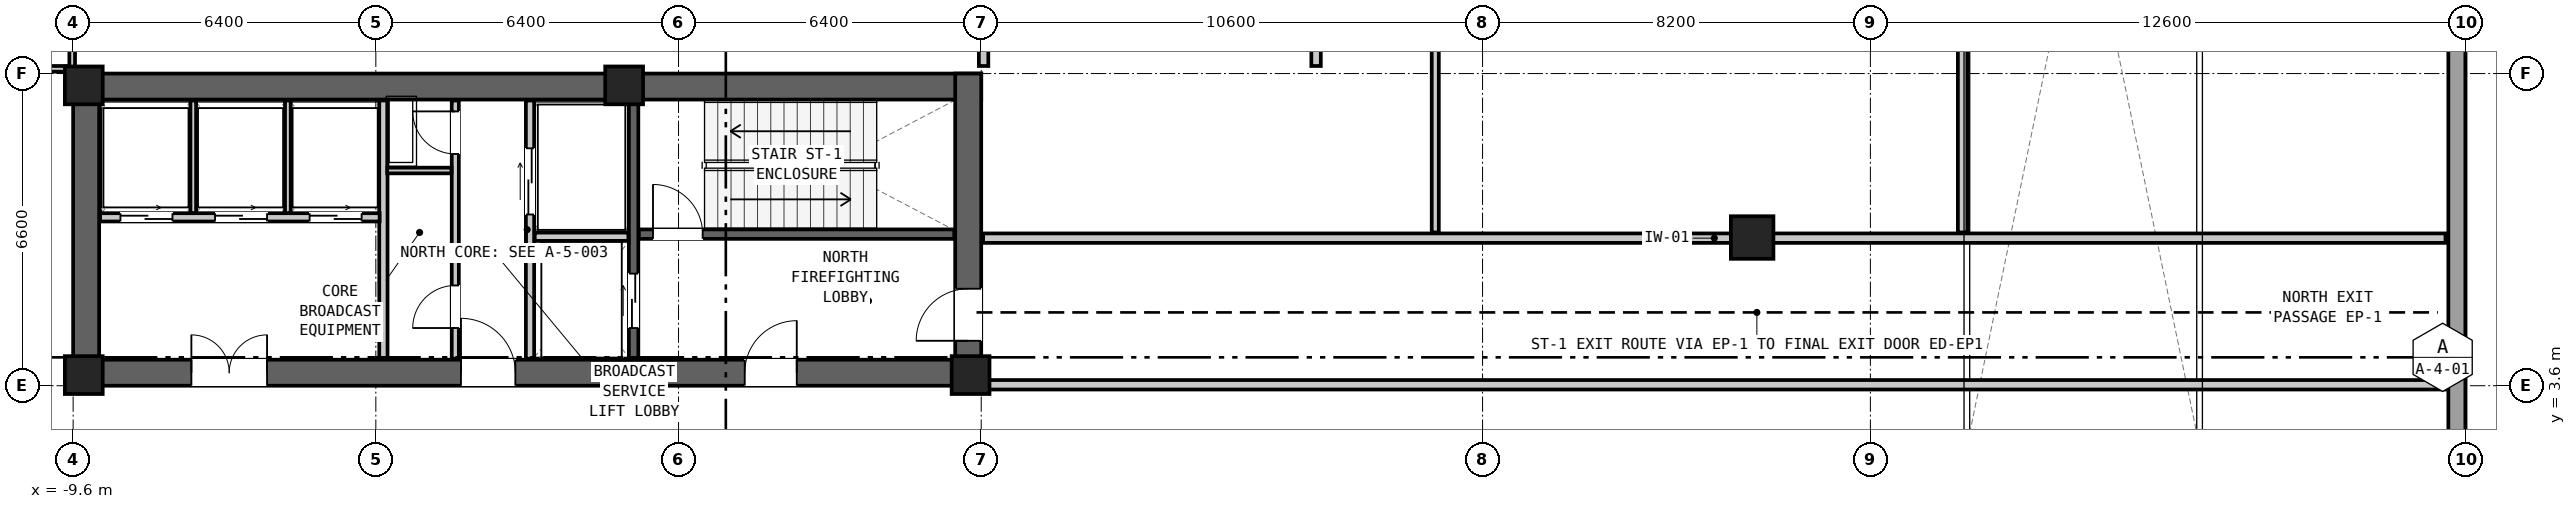
"""IFC4 building model, lengths in metres.
Left out: names, types, materials, properties, quantities, classifications, styles, units other than length and angle.
Written with IfcOpenShell. Run it as: python <this file> out.ifc"""

import sys

from ifc_helpers import new_model, si_unit, direction, frame, frame_2d, origin, origin_2d, place, context, subcontext, project, spatial, rectangle, hollow_rectangle, extrude, element, fill, save


model = new_model("IFC4")
c1 = context("Model", 3, precision=1e-05, world=origin(), true_north=direction((0.0, 1.0)))
c2 = subcontext(c1, "Body", "Model", "MODEL_VIEW")
j1 = project(units=[si_unit("LENGTHUNIT", "METRE"), si_unit("PLANEANGLEUNIT", "RADIAN")], contexts=[c1])
p1 = place(None, origin())
s1 = spatial("IfcSite", under=j1, at=p1, CompositionType="ELEMENT")
p2 = place(p1, origin())
s2 = spatial("IfcBuilding", under=s1, at=p2, CompositionType="ELEMENT")
p3 = place(p2, origin())
s3 = spatial("IfcBuildingStorey", under=s2, at=p3, CompositionType="ELEMENT", Elevation=0.0)
p4 = place(p3, frame((-9.6, 9.925, 0.0), z_axis=(0.0, 0.0, 1.0), x_axis=(1.0, 0.0, 0.0)))
e1 = element("IfcWall", 1, at=p4, inside=s3, PredefinedType="SHEAR", context=c2, shape_type="SweptSolid", body=[
    extrude(rectangle(XDim=19.2, YDim=0.55, at=frame_2d((9.6, 0.0))), origin(), (0.0, 0.0, 1.0), 5.1),
])
p5 = place(p3, frame((-9.6, 3.875, 0.0), z_axis=(0.0, 0.0, 1.0), x_axis=(1.0, 0.0, 0.0)))
e2 = element("IfcWall", 2, at=p5, inside=s3, PredefinedType="SHEAR", context=c2, shape_type="SweptSolid", body=[
    extrude(rectangle(XDim=19.2, YDim=0.55, at=frame_2d((9.6, 0.0))), origin(), (0.0, 0.0, 1.0), 5.1),
])
p6 = place(p5, frame((14.2, 0.0, 0.0)))
e3 = element("IfcOpeningElement", 3, at=p6, cuts=e2, PredefinedType="OPENING", context=c2, shape_type="SweptSolid", body=[
    extrude(rectangle(XDim=1.1, YDim=2.08, at=frame_2d((0.55, 1.04))), frame((0.0, 0.287, 0.0), z_axis=(0.0, -1.0, 0.0), x_axis=(1.0, 0.0, 0.0)), (0.0, 0.0, 1.0), 0.574),
])
p7 = place(p5, frame((8.2, 0.0, 0.0)))
e4 = element("IfcOpeningElement", 4, at=p7, cuts=e2, PredefinedType="OPENING", context=c2, shape_type="SweptSolid", body=[
    extrude(rectangle(XDim=1.15, YDim=2.1, at=frame_2d((0.575, 1.05))), frame((0.0, 0.287, 0.0), z_axis=(0.0, -1.0, 0.0), x_axis=(1.0, 0.0, 0.0)), (0.0, 0.0, 1.0), 0.574),
])
p8 = place(p5, frame((2.5, 0.0, 0.0)))
e5 = element("IfcOpeningElement", 5, at=p8, cuts=e2, PredefinedType="OPENING", context=c2, shape_type="SweptSolid", body=[
    extrude(rectangle(XDim=1.6, YDim=2.12, at=frame_2d((0.8, 1.06))), frame((0.0, 0.287, 0.0), z_axis=(0.0, -1.0, 0.0), x_axis=(1.0, 0.0, 0.0)), (0.0, 0.0, 1.0), 0.574),
])
p9 = place(p3, frame((-9.325, 3.6, 0.0), z_axis=(0.0, 0.0, 1.0), x_axis=(0.0, 1.0, 0.0)))
e6 = element("IfcWall", 6, at=p9, inside=s3, PredefinedType="SHEAR", context=c2, shape_type="SweptSolid", body=[
    extrude(rectangle(XDim=6.6, YDim=0.55, at=frame_2d((3.3, 0.0))), origin(), (0.0, 0.0, 1.0), 5.1),
])
p10 = place(p3, frame((9.325, 3.6, 0.0), z_axis=(0.0, 0.0, 1.0), x_axis=(0.0, 1.0, 0.0)))
e7 = element("IfcWall", 7, at=p10, inside=s3, PredefinedType="SHEAR", context=c2, shape_type="SweptSolid", body=[
    extrude(rectangle(XDim=6.6, YDim=0.55, at=frame_2d((3.3, 0.0))), origin(), (0.0, 0.0, 1.0), 5.1),
])
p11 = place(p10, frame((0.95, 0.0, 0.0)))
e8 = element("IfcOpeningElement", 8, at=p11, cuts=e7, PredefinedType="OPENING", context=c2, shape_type="SweptSolid", body=[
    extrude(rectangle(XDim=1.1, YDim=2.08, at=frame_2d((0.55, 1.04))), frame((0.0, 0.287, 0.0), z_axis=(0.0, -1.0, 0.0), x_axis=(1.0, 0.0, 0.0)), (0.0, 0.0, 1.0), 0.574),
])
p12 = place(p3, frame((25.9, 6.733, 0.0), z_axis=(0.0, 0.0, 1.0), x_axis=(0.0, 1.0, 0.0)))
e9 = element("IfcColumn", 9, at=p12, inside=s3, PredefinedType="COLUMN", context=c2, shape_type="SweptSolid", body=[
    extrude(hollow_rectangle(XDim=0.9, YDim=0.9, WallThickness=0.055, at=origin_2d()), origin(), (0.0, 0.0, 1.0), 5.1),
])
for number, where, z_axis, x_axis in (
    (10, (-9.375, 9.95, 0.0), (0.0, 0.0, 1.0), (1.0, 0.0, 0.0)),
    (11, (2.05, 9.95, 0.0), (0.0, 0.0, 1.0), (1.0, 0.0, 0.0)),
    (12, (-9.375, 3.825, 0.0), (0.0, 0.0, 1.0), (1.0, 0.0, 0.0)),
    (13, (9.375, 3.825, 0.0), (0.0, 0.0, 1.0), (1.0, 0.0, 0.0)),
):
    element("IfcColumn", number, at=place(p3, frame(where, z_axis=z_axis, x_axis=x_axis)), inside=s3, PredefinedType="COLUMN", context=c2, shape_type="SweptSolid", body=[
        extrude(rectangle(XDim=0.8, YDim=0.8, at=origin_2d()), origin(), (0.0, 0.0, 1.0), 5.1),
    ])
p13 = place(p3, frame((40.8, 27.8, 0.0), z_axis=(0.0, 0.0, 1.0), x_axis=(0.0, -1.0, 0.0)))
e14 = element("IfcWall", 14, at=p13, inside=s3, PredefinedType="SOLIDWALL", context=c2, shape_type="SweptSolid", body=[
    extrude(rectangle(XDim=33.35, YDim=0.36, at=frame_2d((16.675, 0.0))), origin(), (0.0, 0.0, 1.0), 4.78),
])
p14 = place(p13, frame((9.8, 0.0, 0.0)))
e15 = element("IfcOpeningElement", 15, at=p14, cuts=e14, PredefinedType="OPENING", context=c2, shape_type="SweptSolid", body=[
    extrude(rectangle(XDim=1.8, YDim=2.25, at=frame_2d((0.9, 1.125))), frame((0.0, 0.192, 0.0), z_axis=(0.0, -1.0, 0.0), x_axis=(1.0, 0.0, 0.0)), (0.0, 0.0, 1.0), 0.384),
])
p15 = place(p3, frame((2.36, 6.805, 0.0), z_axis=(0.0, 0.0, 1.0), x_axis=(1.0, 0.0, 0.0)))
e16 = element("IfcWall", 16, at=p15, inside=s3, PredefinedType="SHEAR", context=c2, shape_type="SweptSolid", body=[
    extrude(rectangle(XDim=6.67, YDim=0.2, at=frame_2d((3.335, 0.0))), origin(), (0.0, 0.0, 1.0), 4.78),
])
p16 = place(p15, frame((0.3, 0.0, 0.0)))
e17 = element("IfcOpeningElement", 17, at=p16, cuts=e16, PredefinedType="OPENING", context=c2, shape_type="SweptSolid", body=[
    extrude(rectangle(XDim=1.05, YDim=2.08, at=frame_2d((0.525, 1.04))), frame((0.0, 0.112, 0.0), z_axis=(0.0, -1.0, 0.0), x_axis=(1.0, 0.0, 0.0)), (0.0, 0.0, 1.0), 0.224),
])
p17 = place(p3, frame((2.25, 4.17, 0.0), z_axis=(0.0, 0.0, 1.0), x_axis=(0.0, 1.0, 0.0)))
e18 = element("IfcWall", 18, at=p17, inside=s3, PredefinedType="SHEAR", context=c2, shape_type="SweptSolid", body=[
    extrude(rectangle(XDim=5.46, YDim=0.2, at=frame_2d((2.73, 0.0))), origin(), (0.0, 0.0, 1.0), 4.78),
])
p18 = place(p17, frame((0.65, 0.0, 0.0)))
e19 = element("IfcOpeningElement", 19, at=p18, cuts=e18, PredefinedType="OPENING", context=c2, shape_type="SweptSolid", body=[
    extrude(rectangle(XDim=1.15, YDim=2.08, at=frame_2d((0.575, 1.04))), frame((0.0, 0.112, 0.0), z_axis=(0.0, -1.0, 0.0), x_axis=(1.0, 0.0, 0.0)), (0.0, 0.0, 1.0), 0.224),
])
p19 = place(p3, frame((0.06, 4.17, 0.0), z_axis=(0.0, 0.0, 1.0), x_axis=(0.0, 1.0, 0.0)))
e20 = element("IfcWall", 20, at=p19, inside=s3, PredefinedType="PARTITIONING", context=c2, shape_type="SweptSolid", body=[
    extrude(rectangle(XDim=5.46, YDim=0.175, at=frame_2d((2.73, 0.0))), origin(), (0.0, 0.0, 1.0), 4.78),
])
p20 = place(p19, frame((3.05, 0.0, 0.0)))
e21 = element("IfcOpeningElement", 21, at=p20, cuts=e20, PredefinedType="OPENING", context=c2, shape_type="SweptSolid", body=[
    extrude(rectangle(XDim=1.4, YDim=2.12, at=frame_2d((0.7, 1.06))), frame((0.0, 0.1, 0.0), z_axis=(0.0, -1.0, 0.0), x_axis=(1.0, 0.0, 0.0)), (0.0, 0.0, 1.0), 0.199),
])
p21 = place(p3, frame((0.16, 6.75, 0.0), z_axis=(0.0, 0.0, 1.0), x_axis=(1.0, 0.0, 0.0)))
e22 = element("IfcWall", 22, at=p21, inside=s3, PredefinedType="PARTITIONING", context=c2, shape_type="SweptSolid", body=[
    extrude(rectangle(XDim=1.98, YDim=0.175, at=frame_2d((0.99, 0.0))), origin(), (0.0, 0.0, 1.0), 4.78),
])
p22 = place(p3, frame((-3.04, 4.17, 0.0), z_axis=(0.0, 0.0, 1.0), x_axis=(0.0, 1.0, 0.0)))
e23 = element("IfcWall", 23, at=p22, inside=s3, PredefinedType="PARTITIONING", context=c2, shape_type="SweptSolid", body=[
    extrude(rectangle(XDim=5.46, YDim=0.175, at=frame_2d((2.73, 0.0))), origin(), (0.0, 0.0, 1.0), 4.78),
])
p23 = place(p3, frame((-1.52, 4.17, 0.0), z_axis=(0.0, 0.0, 1.0), x_axis=(0.0, 1.0, 0.0)))
e24 = element("IfcWall", 24, at=p23, inside=s3, PredefinedType="PARTITIONING", context=c2, shape_type="SweptSolid", body=[
    extrude(rectangle(XDim=5.46, YDim=0.15, at=frame_2d((2.73, 0.0))), origin(), (0.0, 0.0, 1.0), 4.78),
])
p24 = place(p23, frame((4.33, 0.0, 0.0)))
e25 = element("IfcOpeningElement", 25, at=p24, cuts=e24, PredefinedType="OPENING", context=c2, shape_type="SweptSolid", body=[
    extrude(rectangle(XDim=0.9, YDim=2.05, at=frame_2d((0.45, 1.025))), frame((0.0, 0.087, 0.0), z_axis=(0.0, -1.0, 0.0), x_axis=(1.0, 0.0, 0.0)), (0.0, 0.0, 1.0), 0.174),
])
p25 = place(p23, frame((0.65, 0.0, 0.0)))
e26 = element("IfcOpeningElement", 26, at=p25, cuts=e24, PredefinedType="OPENING", context=c2, shape_type="SweptSolid", body=[
    extrude(rectangle(XDim=0.9, YDim=2.05, at=frame_2d((0.45, 1.025))), frame((0.0, 0.087, 0.0), z_axis=(0.0, -1.0, 0.0), x_axis=(1.0, 0.0, 0.0)), (0.0, 0.0, 1.0), 0.174),
])
p26 = place(p3, frame((-2.96, 8.15, 0.0), z_axis=(0.0, 0.0, 1.0), x_axis=(1.0, 0.0, 0.0)))
e27 = element("IfcWall", 27, at=p26, inside=s3, PredefinedType="PARTITIONING", context=c2, shape_type="SweptSolid", body=[
    extrude(rectangle(XDim=1.36, YDim=0.12, at=frame_2d((0.68, 0.0))), origin(), (0.0, 0.0, 1.0), 4.78),
])
p27 = place(p3, frame((-9.03, 7.16, 0.0), z_axis=(0.0, 0.0, 1.0), x_axis=(1.0, 0.0, 0.0)))
e28 = element("IfcWall", 28, at=p27, inside=s3, PredefinedType="PARTITIONING", context=c2, shape_type="SweptSolid", body=[
    extrude(rectangle(XDim=5.91, YDim=0.175, at=frame_2d((2.955, 0.0))), origin(), (0.0, 0.0, 1.0), 4.78),
])
p28 = place(p27, frame((0.43, 0.0, 0.0)))
e29 = element("IfcOpeningElement", 29, at=p28, cuts=e28, PredefinedType="OPENING", context=c2, shape_type="SweptSolid", body=[
    extrude(rectangle(XDim=1.1, YDim=2.06, at=frame_2d((0.55, 1.03))), frame((0.0, 0.1, 0.0), z_axis=(0.0, -1.0, 0.0), x_axis=(1.0, 0.0, 0.0)), (0.0, 0.0, 1.0), 0.199),
])
p29 = place(p27, frame((2.43, 0.0, 0.0)))
e30 = element("IfcOpeningElement", 30, at=p29, cuts=e28, PredefinedType="OPENING", context=c2, shape_type="SweptSolid", body=[
    extrude(rectangle(XDim=1.1, YDim=2.06, at=frame_2d((0.55, 1.03))), frame((0.0, 0.1, 0.0), z_axis=(0.0, -1.0, 0.0), x_axis=(1.0, 0.0, 0.0)), (0.0, 0.0, 1.0), 0.199),
])
p30 = place(p27, frame((4.43, 0.0, 0.0)))
e31 = element("IfcOpeningElement", 31, at=p30, cuts=e28, PredefinedType="OPENING", context=c2, shape_type="SweptSolid", body=[
    extrude(rectangle(XDim=1.1, YDim=2.06, at=frame_2d((0.55, 1.03))), frame((0.0, 0.1, 0.0), z_axis=(0.0, -1.0, 0.0), x_axis=(1.0, 0.0, 0.0)), (0.0, 0.0, 1.0), 0.199),
])
for number, where, z_axis, x_axis in (
    (32, (-7.06, 7.25, 0.0), (0.0, 0.0, 1.0), (0.0, 1.0, 0.0)),
    (33, (-5.06, 7.25, 0.0), (0.0, 0.0, 1.0), (0.0, 1.0, 0.0)),
):
    element("IfcWall", number, at=place(p3, frame(where, z_axis=z_axis, x_axis=x_axis)), inside=s3, PredefinedType="PARTITIONING", context=c2, shape_type="SweptSolid", body=[
        extrude(rectangle(XDim=2.38, YDim=0.12, at=frame_2d((1.19, 0.0))), origin(), (0.0, 0.0, 1.0), 4.78),
    ])
p31 = place(p3, frame((9.64, 6.72, 0.0), z_axis=(0.0, 0.0, 1.0), x_axis=(1.0, 0.0, 0.0)))
e34 = element("IfcWall", 34, at=p31, inside=s3, PredefinedType="PARTITIONING", context=c2, shape_type="SweptSolid", body=[
    extrude(rectangle(XDim=30.92, YDim=0.2, at=frame_2d((15.46, 0.0))), origin(), (0.0, 0.0, 1.0), 4.78),
])
p32 = place(p3, frame((40.56, 3.62, 0.0), z_axis=(0.0, 0.0, 1.0), x_axis=(-1.0, 0.0, 0.0)))
e35 = element("IfcWall", 35, at=p32, inside=s3, PredefinedType="PARTITIONING", context=c2, shape_type="SweptSolid", body=[
    extrude(rectangle(XDim=30.92, YDim=0.2, at=frame_2d((15.46, 0.0))), origin(), (0.0, 0.0, 1.0), 3.642),
])
p33 = place(p3, frame((9.65, 10.36, 0.0), z_axis=(0.0, 0.0, 1.0), x_axis=(0.0, 1.0, 0.0)))
e36 = element("IfcWall", 36, at=p33, inside=s3, PredefinedType="PARTITIONING", context=c2, shape_type="SweptSolid", body=[
    extrude(rectangle(XDim=4.73, YDim=0.2, at=frame_2d((2.365, 0.0))), origin(), (0.0, 0.0, 1.0), 4.78),
])
p34 = place(p3, frame((16.68, 10.36, 0.0), z_axis=(0.0, 0.0, 1.0), x_axis=(0.0, 1.0, 0.0)))
e37 = element("IfcWall", 37, at=p34, inside=s3, PredefinedType="PARTITIONING", context=c2, shape_type="SweptSolid", body=[
    extrude(rectangle(XDim=4.73, YDim=0.2, at=frame_2d((2.365, 0.0))), origin(), (0.0, 0.0, 1.0), 4.78),
])
p35 = place(p34, frame((1.29, 0.0, 0.0)))
e38 = element("IfcOpeningElement", 38, at=p35, cuts=e37, PredefinedType="OPENING", context=c2, shape_type="SweptSolid", body=[
    extrude(rectangle(XDim=1.1, YDim=2.08, at=frame_2d((0.55, 1.04))), frame((0.0, 0.112, 0.0), z_axis=(0.0, -1.0, 0.0), x_axis=(1.0, 0.0, 0.0)), (0.0, 0.0, 1.0), 0.224),
])
p36 = place(p3, frame((-15.53, 10.3, 0.0), z_axis=(0.0, 0.0, 1.0), x_axis=(1.0, 0.0, 0.0)))
e39 = element("IfcWall", 39, at=p36, inside=s3, PredefinedType="PARTITIONING", context=c2, shape_type="SweptSolid", body=[
    extrude(rectangle(XDim=5.91, YDim=0.12, at=frame_2d((2.955, 0.0))), origin(), (0.0, 0.0, 1.0), 4.78),
])
p37 = place(p36, frame((4.017, 0.0, 0.0)))
e40 = element("IfcOpeningElement", 40, at=p37, cuts=e39, PredefinedType="OPENING", context=c2, shape_type="SweptSolid", body=[
    extrude(rectangle(XDim=0.92, YDim=2.1, at=frame_2d((0.46, 1.05))), frame((0.0, 0.072, 0.0), z_axis=(0.0, -1.0, 0.0), x_axis=(1.0, 0.0, 0.0)), (0.0, 0.0, 1.0), 0.144),
])
p38 = place(p3, frame((-9.62, 10.34, 0.0), z_axis=(0.0, 0.0, 1.0), x_axis=(0.0, 1.0, 0.0)))
e41 = element("IfcWall", 41, at=p38, inside=s3, PredefinedType="PARTITIONING", context=c2, shape_type="SweptSolid", body=[
    extrude(rectangle(XDim=7.46, YDim=0.12, at=frame_2d((3.73, 0.0))), origin(), (0.0, 0.0, 1.0), 4.78),
])
p39 = place(p3, frame((19.2, 6.84, 0.0), z_axis=(0.0, 0.0, 1.0), x_axis=(0.0, 1.0, 0.0)))
e42 = element("IfcWall", 42, at=p39, inside=s3, PredefinedType="PARTITIONING", context=c2, shape_type="SweptSolid", body=[
    extrude(rectangle(XDim=18.9, YDim=0.15, at=frame_2d((9.45, 0.0))), origin(), (0.0, 0.0, 1.0), 4.78),
])
p40 = place(p39, frame((5.573, 0.0, 0.0)))
e43 = element("IfcOpeningElement", 43, at=p40, cuts=e42, PredefinedType="OPENING", context=c2, shape_type="SweptSolid", body=[
    extrude(rectangle(XDim=1.0, YDim=2.06, at=frame_2d((0.5, 1.03))), frame((0.0, 0.087, 0.0), z_axis=(0.0, -1.0, 0.0), x_axis=(1.0, 0.0, 0.0)), (0.0, 0.0, 1.0), 0.174),
])
p41 = place(p3, frame((30.35, 6.84, 0.0), z_axis=(0.0, 0.0, 1.0), x_axis=(0.0, 1.0, 0.0)))
e44 = element("IfcWall", 44, at=p41, inside=s3, PredefinedType="PARTITIONING", context=c2, shape_type="SweptSolid", body=[
    extrude(rectangle(XDim=13.9, YDim=0.2, at=frame_2d((6.95, 0.0))), origin(), (0.0, 0.0, 1.0), 4.78),
])
p42 = place(p16, origin())
e45 = element("IfcDoor", 45, at=p42, inside=s3, OperationType="SINGLE_SWING_LEFT", PredefinedType="DOOR", context=c2, shape_type="SweptSolid", body=[
    extrude(rectangle(XDim=1.05, YDim=2.08, at=frame_2d((0.525, 1.04))), frame((0.0, 0.025, 0.0), z_axis=(0.0, -1.0, 0.0), x_axis=(1.0, 0.0, 0.0)), (0.0, 0.0, 1.0), 0.05),
])
fill(e17, e45)
p43 = place(p6, origin())
e46 = element("IfcDoor", 46, at=p43, inside=s3, OperationType="SINGLE_SWING_RIGHT", PredefinedType="DOOR", context=c2, shape_type="SweptSolid", body=[
    extrude(rectangle(XDim=1.1, YDim=2.08, at=frame_2d((0.55, 1.04))), frame((0.0, 0.025, 0.0), z_axis=(0.0, -1.0, 0.0), x_axis=(1.0, 0.0, 0.0)), (0.0, 0.0, 1.0), 0.05),
])
fill(e3, e46)
p44 = place(p18, origin())
e47 = element("IfcDoor", 47, at=p44, inside=s3, OperationType="DOUBLE_DOOR_SLIDING", PredefinedType="DOOR", context=c2, shape_type="SweptSolid", body=[
    extrude(rectangle(XDim=1.15, YDim=2.08, at=frame_2d((0.575, 1.04))), frame((0.0, 0.025, 0.0), z_axis=(0.0, -1.0, 0.0), x_axis=(1.0, 0.0, 0.0)), (0.0, 0.0, 1.0), 0.05),
])
fill(e19, e47)
p45 = place(p20, origin())
e48 = element("IfcDoor", 48, at=p45, inside=s3, OperationType="DOUBLE_DOOR_SLIDING", PredefinedType="DOOR", context=c2, shape_type="SweptSolid", body=[
    extrude(rectangle(XDim=1.4, YDim=2.12, at=frame_2d((0.7, 1.06))), frame((0.0, 0.025, 0.0), z_axis=(0.0, -1.0, 0.0), x_axis=(1.0, 0.0, 0.0)), (0.0, 0.0, 1.0), 0.05),
])
fill(e21, e48)
p46 = place(p7, origin())
e49 = element("IfcDoor", 49, at=p46, inside=s3, OperationType="SINGLE_SWING_LEFT", PredefinedType="DOOR", context=c2, shape_type="SweptSolid", body=[
    extrude(rectangle(XDim=1.15, YDim=2.1, at=frame_2d((0.575, 1.05))), frame((0.0, 0.025, 0.0), z_axis=(0.0, -1.0, 0.0), x_axis=(1.0, 0.0, 0.0)), (0.0, 0.0, 1.0), 0.05),
])
fill(e4, e49)
p47 = place(p24, origin())
e50 = element("IfcDoor", 50, at=p47, inside=s3, OperationType="SINGLE_SWING_RIGHT", PredefinedType="DOOR", context=c2, shape_type="SweptSolid", body=[
    extrude(rectangle(XDim=0.9, YDim=2.05, at=frame_2d((0.45, 1.025))), frame((0.0, 0.025, 0.0), z_axis=(0.0, -1.0, 0.0), x_axis=(1.0, 0.0, 0.0)), (0.0, 0.0, 1.0), 0.05),
])
fill(e25, e50)
p48 = place(p25, origin())
e51 = element("IfcDoor", 51, at=p48, inside=s3, OperationType="SINGLE_SWING_LEFT", PredefinedType="DOOR", context=c2, shape_type="SweptSolid", body=[
    extrude(rectangle(XDim=0.9, YDim=2.05, at=frame_2d((0.45, 1.025))), frame((0.0, 0.025, 0.0), z_axis=(0.0, -1.0, 0.0), x_axis=(1.0, 0.0, 0.0)), (0.0, 0.0, 1.0), 0.05),
])
fill(e26, e51)
p49 = place(p28, origin())
e52 = element("IfcDoor", 52, at=p49, inside=s3, OperationType="DOUBLE_DOOR_SLIDING", PredefinedType="DOOR", context=c2, shape_type="SweptSolid", body=[
    extrude(rectangle(XDim=1.1, YDim=2.06, at=frame_2d((0.55, 1.03))), frame((0.0, 0.025, 0.0), z_axis=(0.0, -1.0, 0.0), x_axis=(1.0, 0.0, 0.0)), (0.0, 0.0, 1.0), 0.05),
])
fill(e29, e52)
p50 = place(p29, origin())
e53 = element("IfcDoor", 53, at=p50, inside=s3, OperationType="DOUBLE_DOOR_SLIDING", PredefinedType="DOOR", context=c2, shape_type="SweptSolid", body=[
    extrude(rectangle(XDim=1.1, YDim=2.06, at=frame_2d((0.55, 1.03))), frame((0.0, 0.025, 0.0), z_axis=(0.0, -1.0, 0.0), x_axis=(1.0, 0.0, 0.0)), (0.0, 0.0, 1.0), 0.05),
])
fill(e30, e53)
p51 = place(p30, origin())
e54 = element("IfcDoor", 54, at=p51, inside=s3, OperationType="DOUBLE_DOOR_SLIDING", PredefinedType="DOOR", context=c2, shape_type="SweptSolid", body=[
    extrude(rectangle(XDim=1.1, YDim=2.06, at=frame_2d((0.55, 1.03))), frame((0.0, 0.025, 0.0), z_axis=(0.0, -1.0, 0.0), x_axis=(1.0, 0.0, 0.0)), (0.0, 0.0, 1.0), 0.05),
])
fill(e31, e54)
p52 = place(p8, origin())
e55 = element("IfcDoor", 55, at=p52, inside=s3, OperationType="DOUBLE_DOOR_SINGLE_SWING", PredefinedType="DOOR", context=c2, shape_type="SweptSolid", body=[
    extrude(rectangle(XDim=1.6, YDim=2.12, at=frame_2d((0.8, 1.06))), frame((0.0, 0.025, 0.0), z_axis=(0.0, -1.0, 0.0), x_axis=(1.0, 0.0, 0.0)), (0.0, 0.0, 1.0), 0.05),
])
fill(e5, e55)
p53 = place(p11, origin())
e56 = element("IfcDoor", 56, at=p53, inside=s3, OperationType="SINGLE_SWING_LEFT", PredefinedType="DOOR", context=c2, shape_type="SweptSolid", body=[
    extrude(rectangle(XDim=1.1, YDim=2.08, at=frame_2d((0.55, 1.04))), frame((0.0, 0.025, 0.0), z_axis=(0.0, -1.0, 0.0), x_axis=(1.0, 0.0, 0.0)), (0.0, 0.0, 1.0), 0.05),
])
fill(e8, e56)
save(model, sys.argv[1])
